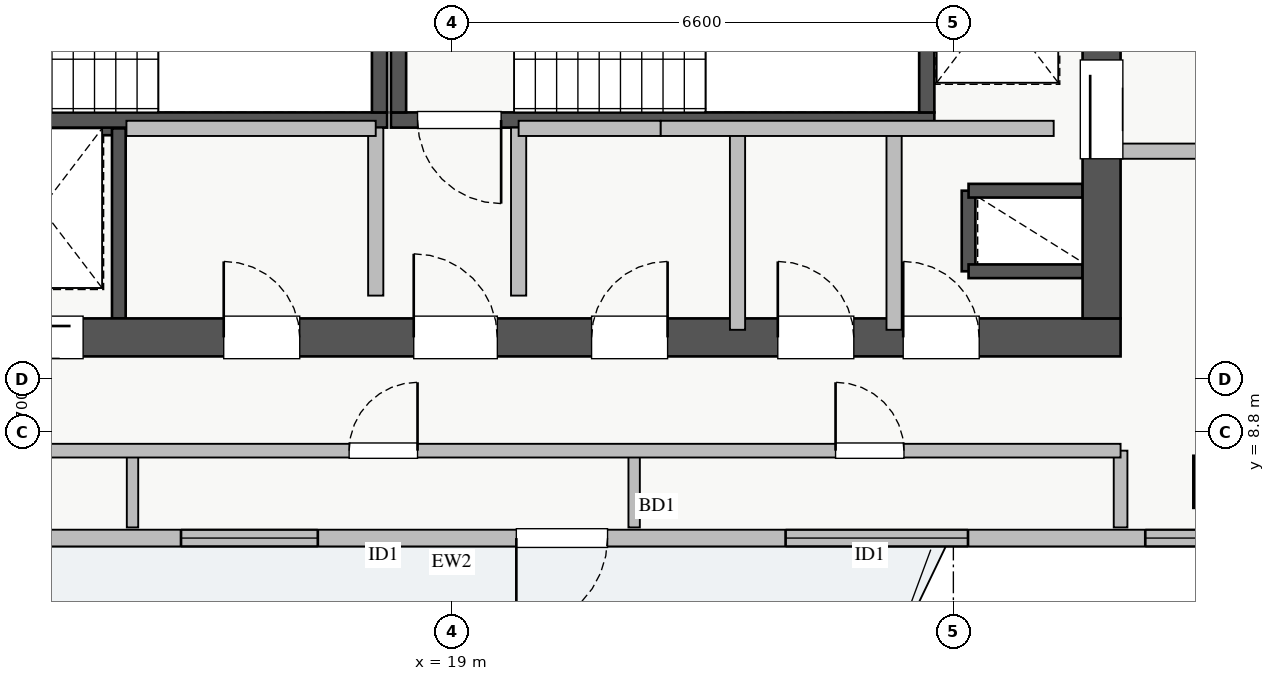
"""IFC4 building model, lengths in metres.
Left out: names, types, materials, properties, quantities, classifications, styles, units other than length and angle.
Written with IfcOpenShell. Run it as: python <this file> out.ifc"""

import sys

from ifc_helpers import new_model, si_unit, direction, frame, frame_2d, origin, origin_2d, place, context, subcontext, project, spatial, rectangle, extrude, source, transform, mapped, element, fill, save


model = new_model("IFC4")
c1 = context("Model", 3, precision=1e-05, world=origin(), true_north=direction((0.0, 1.0)))
c2 = subcontext(c1, "Body", "Model", "MODEL_VIEW")
j1 = project(units=[si_unit("LENGTHUNIT", "METRE"), si_unit("PLANEANGLEUNIT", "RADIAN")], contexts=[c1])
p1 = place(None, origin())
s1 = spatial("IfcSite", under=j1, at=p1, CompositionType="ELEMENT")
p2 = place(p1, origin())
s2 = spatial("IfcBuilding", under=s1, at=p2, CompositionType="ELEMENT")
p3 = place(p2, frame((0.0, 0.0, 260.0)))
s3 = spatial("IfcBuildingStorey", under=s2, at=p3, CompositionType="ELEMENT", Elevation=260.0)
p4 = place(p3, frame((12.68, 12.8, 0.0), z_axis=(0.0, 0.0, 1.0), x_axis=(1.0, 0.0, 0.0)))
e1 = element("IfcWall", 1, at=p4, inside=s3, PredefinedType="SHEAR", context=c2, shape_type="SweptSolid", body=[
    extrude(rectangle(XDim=1.94, YDim=0.18, at=frame_2d((0.97, 0.0))), origin(), (0.0, 0.0, 1.0), 3.03),
])
p5 = place(p3, frame((14.62, 10.3, 0.0), z_axis=(0.0, 0.0, 1.0), x_axis=(0.0, 1.0, 0.0)))
e2 = element("IfcWall", 2, at=p5, inside=s3, PredefinedType="SHEAR", context=c2, shape_type="SweptSolid", body=[
    extrude(rectangle(XDim=2.5, YDim=0.18, at=frame_2d((1.25, 0.0))), origin(), (0.0, 0.0, 1.0), 3.03),
])
p6 = place(p3, frame((25.8, 10.92, 0.0), z_axis=(0.0, 0.0, 1.0), x_axis=(0.0, 1.0, 0.0)))
e3 = element("IfcWall", 3, at=p6, inside=s3, PredefinedType="SHEAR", context=c2, shape_type="SweptSolid", body=[
    extrude(rectangle(XDim=1.06, YDim=0.18, at=frame_2d((0.53, 0.0))), origin(), (0.0, 0.0, 1.0), 3.03),
])
for number, where, z_axis, x_axis in (
    (4, (25.8, 11.98, 0.0), (0.0, 0.0, 1.0), (1.0, 0.0, 0.0)),
    (5, (25.8, 10.92, 0.0), (0.0, 0.0, 1.0), (1.0, 0.0, 0.0)),
):
    element("IfcWall", number, at=place(p3, frame(where, z_axis=z_axis, x_axis=x_axis)), inside=s3, PredefinedType="SHEAR", context=c2, shape_type="SweptSolid", body=[
        extrude(rectangle(XDim=1.5, YDim=0.18, at=frame_2d((0.75, 0.0))), origin(), (0.0, 0.0, 1.0), 3.03),
    ])
p7 = place(p3, frame((10.7, 12.91, 0.0), z_axis=(0.0, 0.0, 1.0), x_axis=(1.0, 0.0, 0.0)))
e6 = element("IfcWall", 6, at=p7, inside=s3, PredefinedType="SHEAR", context=c2, shape_type="SweptSolid", body=[
    extrude(rectangle(XDim=7.45, YDim=0.2, at=frame_2d((3.725, 0.0))), origin(), (0.0, 0.0, 1.0), 3.25),
])
p8 = place(p7, frame((0.35, 0.0, 0.0)))
e7 = element("IfcOpeningElement", 7, at=p8, cuts=e6, PredefinedType="OPENING", context=c2, shape_type="SweptSolid", body=[
    extrude(rectangle(XDim=1.1, YDim=2.05, at=frame_2d((0.55, 1.025))), frame((0.0, 0.11, 0.0), z_axis=(0.0, -1.0, 0.0), x_axis=(1.0, 0.0, 0.0)), (0.0, 0.0, 1.0), 0.22),
])
p9 = place(p3, frame((18.05, 13.01, 0.0), z_axis=(0.0, 0.0, 1.0), x_axis=(0.0, 1.0, 0.0)))
e8 = element("IfcWall", 8, at=p9, inside=s3, PredefinedType="SHEAR", context=c2, shape_type="SweptSolid", body=[
    extrude(rectangle(XDim=2.94, YDim=0.2, at=frame_2d((1.47, 0.0))), origin(), (0.0, 0.0, 1.0), 3.25),
])
p10 = place(p3, frame((18.2, 12.91, 0.0), z_axis=(0.0, 0.0, 1.0), x_axis=(1.0, 0.0, 0.0)))
e9 = element("IfcWall", 9, at=p10, inside=s3, PredefinedType="SHEAR", context=c2, shape_type="SweptSolid", body=[
    extrude(rectangle(XDim=7.15, YDim=0.2, at=frame_2d((3.575, 0.0))), origin(), (0.0, 0.0, 1.0), 3.25),
])
p11 = place(p10, frame((0.35, 0.0, 0.0)))
e10 = element("IfcOpeningElement", 10, at=p11, cuts=e9, PredefinedType="OPENING", context=c2, shape_type="SweptSolid", body=[
    extrude(rectangle(XDim=1.1, YDim=2.05, at=frame_2d((0.55, 1.025))), frame((0.0, 0.11, 0.0), z_axis=(0.0, -1.0, 0.0), x_axis=(1.0, 0.0, 0.0)), (0.0, 0.0, 1.0), 0.22),
])
for number, where, z_axis, x_axis in (
    (11, (18.3, 13.01, 0.0), (0.0, 0.0, 1.0), (0.0, 1.0, 0.0)),
    (12, (25.25, 13.01, 0.0), (0.0, 0.0, 1.0), (0.0, 1.0, 0.0)),
):
    element("IfcWall", number, at=place(p3, frame(where, z_axis=z_axis, x_axis=x_axis)), inside=s3, PredefinedType="SHEAR", context=c2, shape_type="SweptSolid", body=[
        extrude(rectangle(XDim=2.94, YDim=0.2, at=frame_2d((1.47, 0.0))), origin(), (0.0, 0.0, 1.0), 3.25),
    ])
p12 = place(p3, frame((10.2, 10.05, 0.0), z_axis=(0.0, 0.0, 1.0), x_axis=(1.0, 0.0, 0.0)))
e13 = element("IfcWall", 13, at=p12, inside=s3, PredefinedType="SHEAR", context=c2, shape_type="SweptSolid", body=[
    extrude(rectangle(XDim=17.6, YDim=0.5, at=frame_2d((8.8, 0.0))), origin(), (0.0, 0.0, 1.0), 3.25),
])
p13 = place(p12, frame((1.15, 0.0, 0.0)))
e14 = element("IfcOpeningElement", 14, at=p13, cuts=e13, PredefinedType="OPENING", context=c2, shape_type="SweptSolid", body=[
    extrude(rectangle(XDim=1.1, YDim=2.05, at=frame_2d((0.55, 1.025))), frame((0.0, 0.26, 0.0), z_axis=(0.0, -1.0, 0.0), x_axis=(1.0, 0.0, 0.0)), (0.0, 0.0, 1.0), 0.52),
])
p14 = place(p12, frame((8.3, 0.0, 0.0)))
e15 = element("IfcOpeningElement", 15, at=p14, cuts=e13, PredefinedType="OPENING", context=c2, shape_type="SweptSolid", body=[
    extrude(rectangle(XDim=1.1, YDim=2.05, at=frame_2d((0.55, 1.025))), frame((0.0, 0.26, 0.0), z_axis=(0.0, -1.0, 0.0), x_axis=(1.0, 0.0, 0.0)), (0.0, 0.0, 1.0), 0.52),
])
p15 = place(p12, frame((2.85, 0.0, 0.0)))
e16 = element("IfcOpeningElement", 16, at=p15, cuts=e13, PredefinedType="OPENING", context=c2, shape_type="SweptSolid", body=[
    extrude(rectangle(XDim=1.1, YDim=2.05, at=frame_2d((0.55, 1.025))), frame((0.0, 0.26, 0.0), z_axis=(0.0, -1.0, 0.0), x_axis=(1.0, 0.0, 0.0)), (0.0, 0.0, 1.0), 0.52),
])
p16 = place(p12, frame((5.8, 0.0, 0.0)))
e17 = element("IfcOpeningElement", 17, at=p16, cuts=e13, PredefinedType="OPENING", context=c2, shape_type="SweptSolid", body=[
    extrude(rectangle(XDim=1.0, YDim=2.05, at=frame_2d((0.5, 1.025))), frame((0.0, 0.26, 0.0), z_axis=(0.0, -1.0, 0.0), x_axis=(1.0, 0.0, 0.0)), (0.0, 0.0, 1.0), 0.52),
])
p17 = place(p12, frame((14.74, 0.0, 0.0)))
e18 = element("IfcOpeningElement", 18, at=p17, cuts=e13, PredefinedType="OPENING", context=c2, shape_type="SweptSolid", body=[
    extrude(rectangle(XDim=1.0, YDim=2.05, at=frame_2d((0.5, 1.025))), frame((0.0, 0.26, 0.0), z_axis=(0.0, -1.0, 0.0), x_axis=(1.0, 0.0, 0.0)), (0.0, 0.0, 1.0), 0.52),
])
p18 = place(p12, frame((10.64, 0.0, 0.0)))
e19 = element("IfcOpeningElement", 19, at=p18, cuts=e13, PredefinedType="OPENING", context=c2, shape_type="SweptSolid", body=[
    extrude(rectangle(XDim=1.0, YDim=2.05, at=frame_2d((0.5, 1.025))), frame((0.0, 0.26, 0.0), z_axis=(0.0, -1.0, 0.0), x_axis=(1.0, 0.0, 0.0)), (0.0, 0.0, 1.0), 0.52),
])
p19 = place(p12, frame((13.09, 0.0, 0.0)))
e20 = element("IfcOpeningElement", 20, at=p19, cuts=e13, PredefinedType="OPENING", context=c2, shape_type="SweptSolid", body=[
    extrude(rectangle(XDim=1.0, YDim=2.05, at=frame_2d((0.5, 1.025))), frame((0.0, 0.26, 0.0), z_axis=(0.0, -1.0, 0.0), x_axis=(1.0, 0.0, 0.0)), (0.0, 0.0, 1.0), 0.52),
])
p20 = place(p3, frame((27.55, 10.3, 0.0), z_axis=(0.0, 0.0, 1.0), x_axis=(0.0, 1.0, 0.0)))
e21 = element("IfcWall", 21, at=p20, inside=s3, PredefinedType="SHEAR", context=c2, shape_type="SweptSolid", body=[
    extrude(rectangle(XDim=6.2, YDim=0.5, at=frame_2d((3.1, 0.0))), origin(), (0.0, 0.0, 1.0), 3.25),
])
p21 = place(p20, frame((2.1, 0.0, 0.0)))
e22 = element("IfcOpeningElement", 22, at=p21, cuts=e21, PredefinedType="OPENING", context=c2, shape_type="SweptSolid", body=[
    extrude(rectangle(XDim=1.3, YDim=2.05, at=frame_2d((0.65, 1.025))), frame((0.0, 0.26, 0.0), z_axis=(0.0, -1.0, 0.0), x_axis=(1.0, 0.0, 0.0)), (0.0, 0.0, 1.0), 0.52),
])
m1 = source(origin(), c2, "Body", "SweptSolid", [
    extrude(rectangle(XDim=0.65, YDim=0.65, at=origin_2d()), origin(), (0.0, 0.0, 1.0), 3.25),
])
p22 = place(p3, frame((29.1, 8.15, 0.0), z_axis=(0.0, 0.0, 1.0), x_axis=(1.0, 0.0, 0.0)))
e23 = element("IfcColumn", 23, at=p22, inside=s3, PredefinedType="COLUMN", context=c2, shape_type="MappedRepresentation", body=[
    mapped(m1, transform((0.0, 0.0, 0.0), x_axis=(1.0, 0.0, 0.0), y_axis=(0.0, 1.0, 0.0), z_axis=(0.0, 0.0, 1.0), scale=1.0)),
])
p23 = place(p3, frame((8.35, 7.41, 0.0), z_axis=(0.0, 0.0, 1.0), x_axis=(1.0, 0.0, 0.0)))
e24 = element("IfcWall", 24, at=p23, inside=s3, PredefinedType="STANDARD", context=c2, shape_type="SweptSolid", body=[
    extrude(rectangle(XDim=21.3, YDim=0.22, at=frame_2d((10.65, 0.0))), origin(), (0.0, 0.0, 1.0), 2.57),
])
p24 = place(p23, frame((11.5, 0.0, 0.0)))
e25 = element("IfcOpeningElement", 25, at=p24, cuts=e24, PredefinedType="OPENING", context=c2, shape_type="SweptSolid", body=[
    extrude(rectangle(XDim=1.2, YDim=2.1, at=frame_2d((0.6, 1.05))), frame((0.0, 0.12, 0.0), z_axis=(0.0, -1.0, 0.0), x_axis=(1.0, 0.0, 0.0)), (0.0, 0.0, 1.0), 0.24),
])
p25 = place(p23, frame((1.463, 0.0, 0.9)))
e26 = element("IfcOpeningElement", 26, at=p25, cuts=e24, PredefinedType="OPENING", context=c2, shape_type="SweptSolid", body=[
    extrude(rectangle(XDim=2.4, YDim=1.48, at=frame_2d((1.2, 0.74))), frame((0.0, 0.12, 0.0), z_axis=(0.0, -1.0, 0.0), x_axis=(1.0, 0.0, 0.0)), (0.0, 0.0, 1.0), 0.24),
])
p26 = place(p23, frame((7.088, 0.0, 0.9)))
e27 = element("IfcOpeningElement", 27, at=p26, cuts=e24, PredefinedType="OPENING", context=c2, shape_type="SweptSolid", body=[
    extrude(rectangle(XDim=1.8, YDim=1.45, at=frame_2d((0.9, 0.725))), frame((0.0, 0.12, 0.0), z_axis=(0.0, -1.0, 0.0), x_axis=(1.0, 0.0, 0.0)), (0.0, 0.0, 1.0), 0.24),
])
p27 = place(p23, frame((19.775, 0.0, 0.9)))
e28 = element("IfcOpeningElement", 28, at=p27, cuts=e24, PredefinedType="OPENING", context=c2, shape_type="SweptSolid", body=[
    extrude(rectangle(XDim=1.2, YDim=1.4, at=frame_2d((0.6, 0.7))), frame((0.0, 0.12, 0.0), z_axis=(0.0, -1.0, 0.0), x_axis=(1.0, 0.0, 0.0)), (0.0, 0.0, 1.0), 0.24),
])
p28 = place(p23, frame((15.042, 0.0, 0.9)))
e29 = element("IfcOpeningElement", 29, at=p28, cuts=e24, PredefinedType="OPENING", context=c2, shape_type="SweptSolid", body=[
    extrude(rectangle(XDim=2.4, YDim=1.5, at=frame_2d((1.2, 0.75))), frame((0.0, 0.12, 0.0), z_axis=(0.0, -1.0, 0.0), x_axis=(1.0, 0.0, 0.0)), (0.0, 0.0, 1.0), 0.24),
])
p29 = place(p3, frame((27.8, 12.5, 0.0), z_axis=(0.0, 0.0, 1.0), x_axis=(1.0, 0.0, 0.0)))
e30 = element("IfcWall", 30, at=p29, inside=s3, PredefinedType="PARTITIONING", context=c2, shape_type="SweptSolid", body=[
    extrude(rectangle(XDim=3.1, YDim=0.2, at=frame_2d((1.55, 0.0))), origin(), (0.0, 0.0, 1.0), 3.03),
])
for number, where, z_axis, x_axis in (
    (31, (18.0, 10.6, 0.0), (0.0, 0.0, 1.0), (0.0, 1.0, 0.0)),
    (32, (19.88, 10.6, 0.0), (0.0, 0.0, 1.0), (0.0, 1.0, 0.0)),
):
    element("IfcWall", number, at=place(p3, frame(where, z_axis=z_axis, x_axis=x_axis)), inside=s3, PredefinedType="PARTITIONING", context=c2, shape_type="SweptSolid", body=[
        extrude(rectangle(XDim=2.21, YDim=0.2, at=frame_2d((1.105, 0.0))), origin(), (0.0, 0.0, 1.0), 3.03),
    ])
p30 = place(p3, frame((14.72, 12.8, 0.0), z_axis=(0.0, 0.0, 1.0), x_axis=(1.0, 0.0, 0.0)))
e33 = element("IfcWall", 33, at=p30, inside=s3, PredefinedType="PARTITIONING", context=c2, shape_type="SweptSolid", body=[
    extrude(rectangle(XDim=3.28, YDim=0.2, at=frame_2d((1.64, 0.0))), origin(), (0.0, 0.0, 1.0), 3.03),
])
p31 = place(p3, frame((24.82, 10.15, 0.0), z_axis=(0.0, 0.0, 1.0), x_axis=(0.0, 1.0, 0.0)))
e34 = element("IfcWall", 34, at=p31, inside=s3, PredefinedType="PARTITIONING", context=c2, shape_type="SweptSolid", body=[
    extrude(rectangle(XDim=2.65, YDim=0.2, at=frame_2d((1.325, 0.0))), origin(), (0.0, 0.0, 1.0), 3.03),
])
p32 = place(p3, frame((19.88, 12.8, 0.0), z_axis=(0.0, 0.0, 1.0), x_axis=(1.0, 0.0, 0.0)))
e35 = element("IfcWall", 35, at=p32, inside=s3, PredefinedType="PARTITIONING", context=c2, shape_type="SweptSolid", body=[
    extrude(rectangle(XDim=1.87, YDim=0.2, at=frame_2d((0.935, 0.0))), origin(), (0.0, 0.0, 1.0), 3.03),
])
p33 = place(p3, frame((22.76, 10.15, 0.0), z_axis=(0.0, 0.0, 1.0), x_axis=(0.0, 1.0, 0.0)))
e36 = element("IfcWall", 36, at=p33, inside=s3, PredefinedType="PARTITIONING", context=c2, shape_type="SweptSolid", body=[
    extrude(rectangle(XDim=2.65, YDim=0.2, at=frame_2d((1.325, 0.0))), origin(), (0.0, 0.0, 1.0), 3.03),
])
p34 = place(p3, frame((21.75, 12.8, 0.0), z_axis=(0.0, 0.0, 1.0), x_axis=(1.0, 0.0, 0.0)))
e37 = element("IfcWall", 37, at=p34, inside=s3, PredefinedType="PARTITIONING", context=c2, shape_type="SweptSolid", body=[
    extrude(rectangle(XDim=5.17, YDim=0.2, at=frame_2d((2.585, 0.0))), origin(), (0.0, 0.0, 1.0), 3.03),
])
p35 = place(p3, frame((27.8, 7.55, 0.0), z_axis=(0.0, 0.0, 1.0), x_axis=(0.0, 1.0, 0.0)))
e38 = element("IfcWall", 38, at=p35, inside=s3, PredefinedType="PARTITIONING", context=c2, shape_type="SweptSolid", body=[
    extrude(rectangle(XDim=1.01, YDim=0.18, at=frame_2d((0.505, 0.0))), origin(), (0.0, 0.0, 1.0), 3.03),
])
for number, where, z_axis, x_axis in (
    (39, (14.8, 7.55, 0.0), (0.0, 0.0, 1.0), (0.0, 1.0, 0.0)),
    (40, (21.4, 7.55, 0.0), (0.0, 0.0, 1.0), (0.0, 1.0, 0.0)),
):
    element("IfcWall", number, at=place(p3, frame(where, z_axis=z_axis, x_axis=x_axis)), inside=s3, PredefinedType="PARTITIONING", context=c2, shape_type="SweptSolid", body=[
        extrude(rectangle(XDim=1.01, YDim=0.15, at=frame_2d((0.505, 0.0))), origin(), (0.0, 0.0, 1.0), 3.03),
    ])
p36 = place(p3, frame((8.85, 8.56, 0.0), z_axis=(0.0, 0.0, 1.0), x_axis=(1.0, 0.0, 0.0)))
e41 = element("IfcWall", 41, at=p36, inside=s3, PredefinedType="PARTITIONING", context=c2, shape_type="SweptSolid", body=[
    extrude(rectangle(XDim=18.95, YDim=0.18, at=frame_2d((9.475, 0.0))), origin(), (0.0, 0.0, 1.0), 3.03),
])
p37 = place(p36, frame((2.8, 0.0, 0.0)))
e42 = element("IfcOpeningElement", 42, at=p37, cuts=e41, PredefinedType="OPENING", context=c2, shape_type="SweptSolid", body=[
    extrude(rectangle(XDim=0.9, YDim=2.05, at=frame_2d((0.45, 1.025))), frame((0.0, 0.1, 0.0), z_axis=(0.0, -1.0, 0.0), x_axis=(1.0, 0.0, 0.0)), (0.0, 0.0, 1.0), 0.2),
])
p38 = place(p36, frame((8.8, 0.0, 0.0)))
e43 = element("IfcOpeningElement", 43, at=p38, cuts=e41, PredefinedType="OPENING", context=c2, shape_type="SweptSolid", body=[
    extrude(rectangle(XDim=0.9, YDim=2.05, at=frame_2d((0.45, 1.025))), frame((0.0, 0.1, 0.0), z_axis=(0.0, -1.0, 0.0), x_axis=(1.0, 0.0, 0.0)), (0.0, 0.0, 1.0), 0.2),
])
p39 = place(p36, frame((15.2, 0.0, 0.0)))
e44 = element("IfcOpeningElement", 44, at=p39, cuts=e41, PredefinedType="OPENING", context=c2, shape_type="SweptSolid", body=[
    extrude(rectangle(XDim=0.9, YDim=2.05, at=frame_2d((0.45, 1.025))), frame((0.0, 0.1, 0.0), z_axis=(0.0, -1.0, 0.0), x_axis=(1.0, 0.0, 0.0)), (0.0, 0.0, 1.0), 0.2),
])
m2 = source(origin(), c2, "Body", "SweptSolid", [
    extrude(rectangle(XDim=1.2, YDim=2.1, at=frame_2d((0.6, 1.05))), frame((0.0, 0.025, 0.0), z_axis=(0.0, -1.0, 0.0), x_axis=(1.0, 0.0, 0.0)), (0.0, 0.0, 1.0), 0.05),
])
p40 = place(p24, frame((1.2, 0.0, 0.0), z_axis=(0.0, 0.0, 1.0), x_axis=(-1.0, 0.0, 0.0)))
e45 = element("IfcDoor", 45, at=p40, inside=s3, OperationType="SINGLE_SWING_LEFT", PredefinedType="DOOR", context=c2, shape_type="MappedRepresentation", body=[
    mapped(m2, transform((0.0, 0.0, 0.0), x_axis=(1.0, 0.0, 0.0), y_axis=(0.0, 1.0, 0.0), z_axis=(0.0, 0.0, 1.0), scale=1.0)),
])
fill(e25, e45)
m3 = source(origin(), c2, "Body", "SweptSolid", [
    extrude(rectangle(XDim=1.8, YDim=1.45, at=frame_2d((0.9, 0.725))), frame((0.0, 0.03, 0.0), z_axis=(0.0, -1.0, 0.0), x_axis=(1.0, 0.0, 0.0)), (0.0, 0.0, 1.0), 0.06),
])
p41 = place(p26, origin())
e46 = element("IfcWindow", 46, at=p41, inside=s3, PartitioningType="DOUBLE_PANEL_VERTICAL", PredefinedType="WINDOW", context=c2, shape_type="MappedRepresentation", body=[
    mapped(m3, transform((0.0, 0.0, 0.0), x_axis=(1.0, 0.0, 0.0), y_axis=(0.0, 1.0, 0.0), z_axis=(0.0, 0.0, 1.0), scale=1.0)),
])
fill(e27, e46)
m4 = source(origin(), c2, "Body", "SweptSolid", [
    extrude(rectangle(XDim=1.2, YDim=1.4, at=frame_2d((0.6, 0.7))), frame((0.0, 0.03, 0.0), z_axis=(0.0, -1.0, 0.0), x_axis=(1.0, 0.0, 0.0)), (0.0, 0.0, 1.0), 0.06),
])
p42 = place(p27, origin())
e47 = element("IfcWindow", 47, at=p42, inside=s3, PartitioningType="TRIPLE_PANEL_VERTICAL", PredefinedType="WINDOW", context=c2, shape_type="MappedRepresentation", body=[
    mapped(m4, transform((0.0, 0.0, 0.0), x_axis=(1.0, 0.0, 0.0), y_axis=(0.0, 1.0, 0.0), z_axis=(0.0, 0.0, 1.0), scale=1.0)),
])
fill(e28, e47)
m5 = source(origin(), c2, "Body", "SweptSolid", [
    extrude(rectangle(XDim=1.3, YDim=2.05, at=frame_2d((0.65, 1.025))), frame((0.0, 0.025, 0.0), z_axis=(0.0, -1.0, 0.0), x_axis=(1.0, 0.0, 0.0)), (0.0, 0.0, 1.0), 0.05),
])
p43 = place(p21, origin())
e48 = element("IfcDoor", 48, at=p43, inside=s3, OperationType="SLIDING_TO_RIGHT", PredefinedType="DOOR", context=c2, shape_type="MappedRepresentation", body=[
    mapped(m5, transform((0.0, 0.0, 0.0), x_axis=(1.0, 0.0, 0.0), y_axis=(0.0, 1.0, 0.0), z_axis=(0.0, 0.0, 1.0), scale=1.0)),
])
fill(e22, e48)
m6 = source(origin(), c2, "Body", "SweptSolid", [
    extrude(rectangle(XDim=1.1, YDim=2.05, at=frame_2d((0.55, 1.025))), frame((0.0, 0.025, 0.0), z_axis=(0.0, -1.0, 0.0), x_axis=(1.0, 0.0, 0.0)), (0.0, 0.0, 1.0), 0.05),
])
p44 = place(p14, origin())
e49 = element("IfcDoor", 49, at=p44, inside=s3, OperationType="SINGLE_SWING_LEFT", PredefinedType="DOOR", context=c2, shape_type="MappedRepresentation", body=[
    mapped(m6, transform((0.0, 0.0, 0.0), x_axis=(1.0, 0.0, 0.0), y_axis=(0.0, 1.0, 0.0), z_axis=(0.0, 0.0, 1.0), scale=1.0)),
])
fill(e15, e49)
p45 = place(p11, frame((1.1, 0.0, 0.0), z_axis=(0.0, 0.0, 1.0), x_axis=(-1.0, 0.0, 0.0)))
e50 = element("IfcDoor", 50, at=p45, inside=s3, OperationType="SINGLE_SWING_RIGHT", PredefinedType="DOOR", context=c2, shape_type="MappedRepresentation", body=[
    mapped(m6, transform((0.0, 0.0, 0.0), x_axis=(1.0, 0.0, 0.0), y_axis=(0.0, 1.0, 0.0), z_axis=(0.0, 0.0, 1.0), scale=1.0)),
])
fill(e10, e50)
p46 = place(p15, origin())
e51 = element("IfcDoor", 51, at=p46, inside=s3, OperationType="SLIDING_TO_RIGHT", PredefinedType="DOOR", context=c2, shape_type="MappedRepresentation", body=[
    mapped(m6, transform((0.0, 0.0, 0.0), x_axis=(1.0, 0.0, 0.0), y_axis=(0.0, 1.0, 0.0), z_axis=(0.0, 0.0, 1.0), scale=1.0)),
])
fill(e16, e51)
m7 = source(origin(), c2, "Body", "SweptSolid", [
    extrude(rectangle(XDim=1.0, YDim=2.05, at=frame_2d((0.5, 1.025))), frame((0.0, 0.025, 0.0), z_axis=(0.0, -1.0, 0.0), x_axis=(1.0, 0.0, 0.0)), (0.0, 0.0, 1.0), 0.05),
])
p47 = place(p16, origin())
e52 = element("IfcDoor", 52, at=p47, inside=s3, OperationType="SINGLE_SWING_LEFT", PredefinedType="DOOR", context=c2, shape_type="MappedRepresentation", body=[
    mapped(m7, transform((0.0, 0.0, 0.0), x_axis=(1.0, 0.0, 0.0), y_axis=(0.0, 1.0, 0.0), z_axis=(0.0, 0.0, 1.0), scale=1.0)),
])
fill(e17, e52)
p48 = place(p17, origin())
e53 = element("IfcDoor", 53, at=p48, inside=s3, OperationType="SINGLE_SWING_LEFT", PredefinedType="DOOR", context=c2, shape_type="MappedRepresentation", body=[
    mapped(m7, transform((0.0, 0.0, 0.0), x_axis=(1.0, 0.0, 0.0), y_axis=(0.0, 1.0, 0.0), z_axis=(0.0, 0.0, 1.0), scale=1.0)),
])
fill(e18, e53)
p49 = place(p18, origin())
e54 = element("IfcDoor", 54, at=p49, inside=s3, OperationType="SINGLE_SWING_RIGHT", PredefinedType="DOOR", context=c2, shape_type="MappedRepresentation", body=[
    mapped(m7, transform((0.0, 0.0, 0.0), x_axis=(1.0, 0.0, 0.0), y_axis=(0.0, 1.0, 0.0), z_axis=(0.0, 0.0, 1.0), scale=1.0)),
])
fill(e19, e54)
p50 = place(p19, origin())
e55 = element("IfcDoor", 55, at=p50, inside=s3, OperationType="SINGLE_SWING_LEFT", PredefinedType="DOOR", context=c2, shape_type="MappedRepresentation", body=[
    mapped(m7, transform((0.0, 0.0, 0.0), x_axis=(1.0, 0.0, 0.0), y_axis=(0.0, 1.0, 0.0), z_axis=(0.0, 0.0, 1.0), scale=1.0)),
])
fill(e20, e55)
m8 = source(origin(), c2, "Body", "SweptSolid", [
    extrude(rectangle(XDim=0.9, YDim=2.05, at=frame_2d((0.45, 1.025))), frame((0.0, 0.025, 0.0), z_axis=(0.0, -1.0, 0.0), x_axis=(1.0, 0.0, 0.0)), (0.0, 0.0, 1.0), 0.05),
])
p51 = place(p38, origin())
e56 = element("IfcDoor", 56, at=p51, inside=s3, OperationType="SINGLE_SWING_RIGHT", PredefinedType="DOOR", context=c2, shape_type="MappedRepresentation", body=[
    mapped(m8, transform((0.0, 0.0, 0.0), x_axis=(1.0, 0.0, 0.0), y_axis=(0.0, 1.0, 0.0), z_axis=(0.0, 0.0, 1.0), scale=1.0)),
])
fill(e43, e56)
p52 = place(p39, origin())
e57 = element("IfcDoor", 57, at=p52, inside=s3, OperationType="SINGLE_SWING_LEFT", PredefinedType="DOOR", context=c2, shape_type="MappedRepresentation", body=[
    mapped(m8, transform((0.0, 0.0, 0.0), x_axis=(1.0, 0.0, 0.0), y_axis=(0.0, 1.0, 0.0), z_axis=(0.0, 0.0, 1.0), scale=1.0)),
])
fill(e44, e57)
m9 = source(origin(), c2, "Body", "SweptSolid", [
    extrude(rectangle(XDim=2.4, YDim=1.5, at=frame_2d((1.2, 0.75))), frame((0.0, 0.03, 0.0), z_axis=(0.0, -1.0, 0.0), x_axis=(1.0, 0.0, 0.0)), (0.0, 0.0, 1.0), 0.06),
])
p53 = place(p28, origin())
e58 = element("IfcWindow", 58, at=p53, inside=s3, PartitioningType="TRIPLE_PANEL_VERTICAL", PredefinedType="WINDOW", context=c2, shape_type="MappedRepresentation", body=[
    mapped(m9, transform((0.0, 0.0, 0.0), x_axis=(1.0, 0.0, 0.0), y_axis=(0.0, 1.0, 0.0), z_axis=(0.0, 0.0, 1.0), scale=1.0)),
])
fill(e29, e58)
save(model, sys.argv[1])
